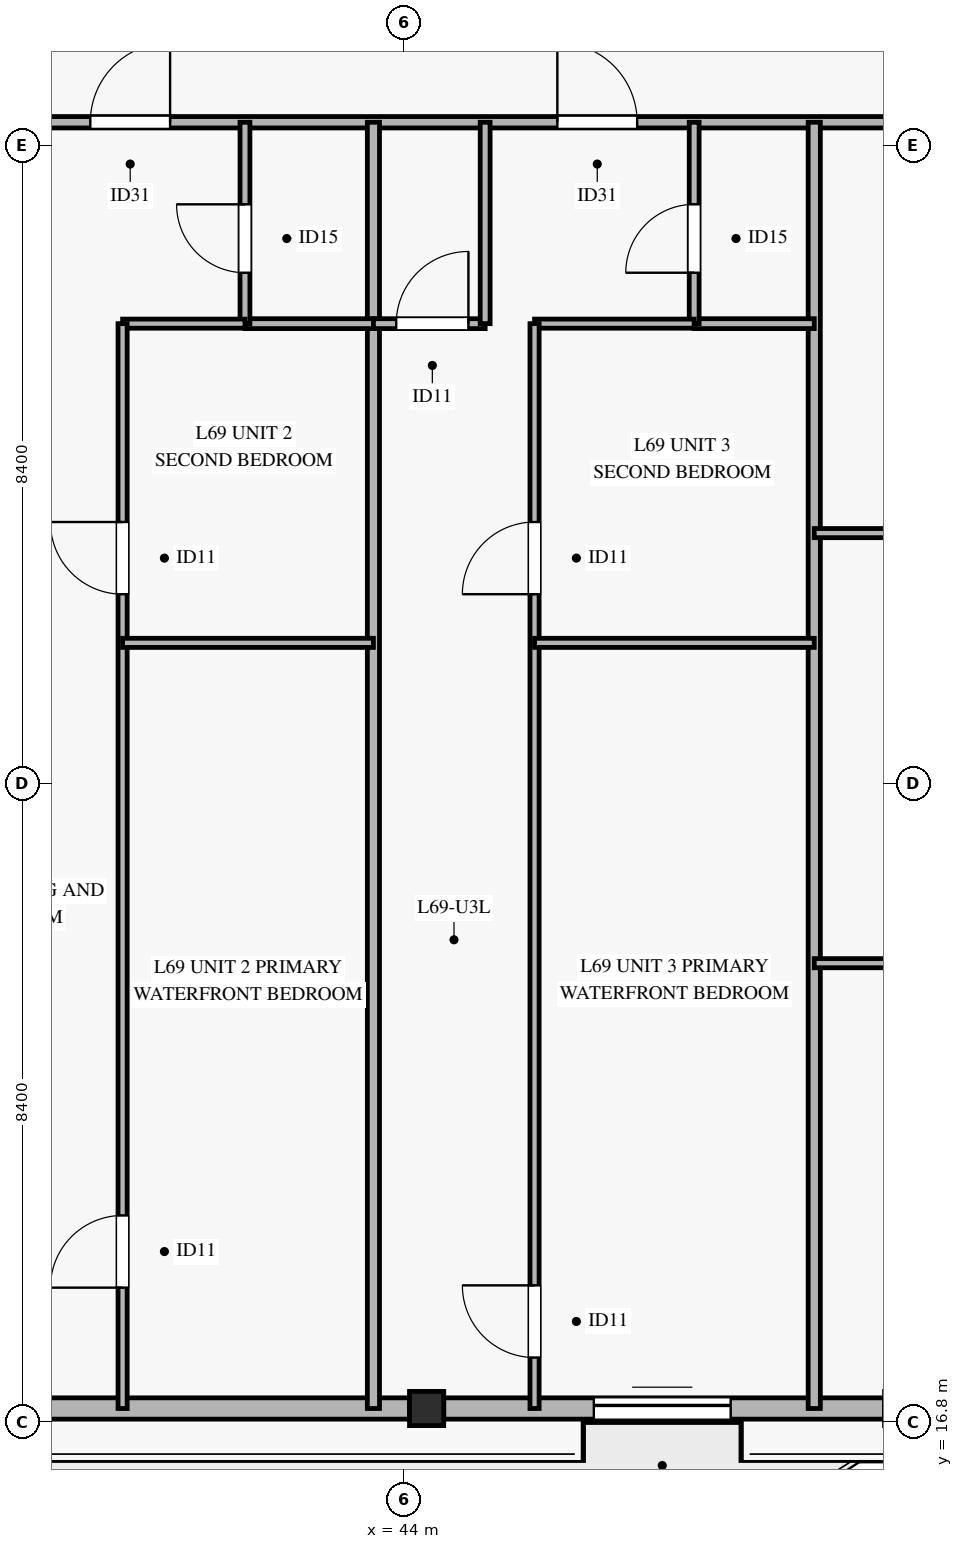
"""IFC4 building model, lengths in metres.
Left out: names, types, materials, properties, quantities, classifications, styles, units other than length and angle.
Written with IfcOpenShell. Run it as: python <this file> out.ifc"""

import sys

from ifc_helpers import new_model, si_unit, direction, frame, frame_2d, origin, origin_2d, place, context, subcontext, project, spatial, rectangle, hollow_rectangle, extrude, source, transform, mapped, element, fill, save


model = new_model("IFC4")
c1 = context("Model", 3, precision=1e-05, world=origin(), true_north=direction((0.0, 1.0)))
c2 = subcontext(c1, "Body", "Model", "MODEL_VIEW")
j1 = project(units=[si_unit("LENGTHUNIT", "METRE"), si_unit("PLANEANGLEUNIT", "RADIAN")], contexts=[c1])
p1 = place(None, origin())
s1 = spatial("IfcSite", under=j1, at=p1, CompositionType="ELEMENT")
p2 = place(p1, origin())
s2 = spatial("IfcBuilding", under=s1, at=p2, CompositionType="ELEMENT")
p3 = place(p2, frame((0.0, 0.0, 268.9)))
s3 = spatial("IfcBuildingStorey", under=s2, at=p3, CompositionType="ELEMENT", Elevation=268.9)
m1 = source(origin(), c2, "Body", "SweptSolid", [
    extrude(hollow_rectangle(XDim=0.45, YDim=0.45, WallThickness=0.022, at=origin_2d()), origin(), (0.0, 0.0, 1.0), 3.185),
])
p4 = place(p3, frame((44.3, 16.976, 0.0), z_axis=(0.0, 0.0, 1.0), x_axis=(1.0, 0.0, 0.0)))
e1 = element("IfcColumn", 1, at=p4, inside=s3, PredefinedType="COLUMN", context=c2, shape_type="MappedRepresentation", body=[
    mapped(m1, transform((0.0, 0.0, 0.0), x_axis=(1.0, 0.0, 0.0), y_axis=(0.0, 1.0, 0.0), z_axis=(0.0, 0.0, 1.0), scale=1.0)),
])
p5 = place(p3, frame((37.775, 16.976, 0.0), z_axis=(0.0, 0.0, 1.0), x_axis=(1.0, 0.0, 0.0)))
e2 = element("IfcWall", 2, at=p5, inside=s3, PredefinedType="SOLIDWALL", context=c2, shape_type="SweptSolid", body=[
    extrude(rectangle(XDim=6.3, YDim=0.28, at=frame_2d((3.15, 0.0))), origin(), (0.0, 0.0, 1.0), 2.815),
])
p6 = place(p3, frame((44.525, 16.976, 0.0), z_axis=(0.0, 0.0, 1.0), x_axis=(1.0, 0.0, 0.0)))
e3 = element("IfcWall", 3, at=p6, inside=s3, PredefinedType="SOLIDWALL", context=c2, shape_type="SweptSolid", body=[
    extrude(rectangle(XDim=5.8, YDim=0.28, at=frame_2d((2.9, 0.0))), origin(), (0.0, 0.0, 1.0), 2.815),
])
p7 = place(p6, frame((1.975, 0.0, 0.0)))
e4 = element("IfcOpeningElement", 4, at=p7, cuts=e3, PredefinedType="OPENING", context=c2, shape_type="SweptSolid", body=[
    extrude(rectangle(XDim=1.8, YDim=2.25, at=frame_2d((0.9, 1.125))), frame((0.0, 0.15, 0.0), z_axis=(0.0, -1.0, 0.0), x_axis=(1.0, 0.0, 0.0)), (0.0, 0.0, 1.0), 0.3),
])
p8 = place(p3, frame((9.194, 33.9, 0.0), z_axis=(0.0, 0.0, 1.0), x_axis=(1.0, 0.0, 0.0)))
e5 = element("IfcWall", 5, at=p8, inside=s3, PredefinedType="PARTITIONING", context=c2, shape_type="SweptSolid", body=[
    extrude(rectangle(XDim=52.013, YDim=0.15, at=frame_2d((26.006, 0.0))), origin(), (0.0, 0.0, 1.0), 2.47),
])
p9 = place(p8, frame((5.729, 0.0, 0.0)))
e6 = element("IfcOpeningElement", 6, at=p9, cuts=e5, PredefinedType="OPENING", context=c2, shape_type="SweptSolid", body=[
    extrude(rectangle(XDim=1.05, YDim=2.15, at=frame_2d((0.525, 1.075))), frame((0.0, 0.085, 0.0), z_axis=(0.0, -1.0, 0.0), x_axis=(1.0, 0.0, 0.0)), (0.0, 0.0, 1.0), 0.17),
])
p10 = place(p8, frame((17.231, 0.0, 0.0)))
e7 = element("IfcOpeningElement", 7, at=p10, cuts=e5, PredefinedType="OPENING", context=c2, shape_type="SweptSolid", body=[
    extrude(rectangle(XDim=1.05, YDim=2.15, at=frame_2d((0.525, 1.075))), frame((0.0, 0.085, 0.0), z_axis=(0.0, -1.0, 0.0), x_axis=(1.0, 0.0, 0.0)), (0.0, 0.0, 1.0), 0.17),
])
p11 = place(p8, frame((23.759, 0.0, 0.0)))
e8 = element("IfcOpeningElement", 8, at=p11, cuts=e5, PredefinedType="OPENING", context=c2, shape_type="SweptSolid", body=[
    extrude(rectangle(XDim=1.05, YDim=2.15, at=frame_2d((0.525, 1.075))), frame((0.0, 0.085, 0.0), z_axis=(0.0, -1.0, 0.0), x_axis=(1.0, 0.0, 0.0)), (0.0, 0.0, 1.0), 0.17),
])
p12 = place(p8, frame((30.681, 0.0, 0.0)))
e9 = element("IfcOpeningElement", 9, at=p12, cuts=e5, PredefinedType="OPENING", context=c2, shape_type="SweptSolid", body=[
    extrude(rectangle(XDim=1.05, YDim=2.15, at=frame_2d((0.525, 1.075))), frame((0.0, 0.085, 0.0), z_axis=(0.0, -1.0, 0.0), x_axis=(1.0, 0.0, 0.0)), (0.0, 0.0, 1.0), 0.17),
])
p13 = place(p8, frame((36.826, 0.0, 0.0)))
e10 = element("IfcOpeningElement", 10, at=p13, cuts=e5, PredefinedType="OPENING", context=c2, shape_type="SweptSolid", body=[
    extrude(rectangle(XDim=1.05, YDim=2.15, at=frame_2d((0.525, 1.075))), frame((0.0, 0.085, 0.0), z_axis=(0.0, -1.0, 0.0), x_axis=(1.0, 0.0, 0.0)), (0.0, 0.0, 1.0), 0.17),
])
p14 = place(p8, frame((44.786, 0.0, 0.0)))
e11 = element("IfcOpeningElement", 11, at=p14, cuts=e5, PredefinedType="OPENING", context=c2, shape_type="SweptSolid", body=[
    extrude(rectangle(XDim=1.05, YDim=2.15, at=frame_2d((0.525, 1.075))), frame((0.0, 0.085, 0.0), z_axis=(0.0, -1.0, 0.0), x_axis=(1.0, 0.0, 0.0)), (0.0, 0.0, 1.0), 0.17),
])
for number, where, z_axis, x_axis in (
    (12, (43.6, 16.976, 0.0), (0.0, 0.0, 1.0), (0.0, 1.0, 0.0)),
    (13, (49.4, 16.976, 0.0), (0.0, 0.0, 1.0), (0.0, 1.0, 0.0)),
):
    element("IfcWall", number, at=place(p3, frame(where, z_axis=z_axis, x_axis=x_axis)), inside=s3, PredefinedType="PARTITIONING", context=c2, shape_type="SweptSolid", body=[
        extrude(rectangle(XDim=16.924, YDim=0.16, at=frame_2d((8.462, 0.0))), origin(), (0.0, 0.0, 1.0), 2.77),
    ])
p15 = place(p3, frame((41.91, 31.25, 0.0), z_axis=(0.0, 0.0, 1.0), x_axis=(1.0, 0.0, 0.0)))
e14 = element("IfcWall", 14, at=p15, inside=s3, PredefinedType="PARTITIONING", context=c2, shape_type="SweptSolid", body=[
    extrude(rectangle(XDim=1.69, YDim=0.13, at=frame_2d((0.845, 0.0))), origin(), (0.0, 0.0, 1.0), 3.185),
])
p16 = place(p3, frame((41.91, 31.25, 0.0), z_axis=(0.0, 0.0, 1.0), x_axis=(0.0, 1.0, 0.0)))
e15 = element("IfcWall", 15, at=p16, inside=s3, PredefinedType="PARTITIONING", context=c2, shape_type="SweptSolid", body=[
    extrude(rectangle(XDim=2.65, YDim=0.13, at=frame_2d((1.325, 0.0))), origin(), (0.0, 0.0, 1.0), 2.77),
])
p17 = place(p16, frame((0.67, 0.0, 0.0)))
e16 = element("IfcOpeningElement", 16, at=p17, cuts=e15, PredefinedType="OPENING", context=c2, shape_type="SweptSolid", body=[
    extrude(rectangle(XDim=0.9, YDim=2.1, at=frame_2d((0.45, 1.05))), frame((0.0, 0.075, 0.0), z_axis=(0.0, -1.0, 0.0), x_axis=(1.0, 0.0, 0.0)), (0.0, 0.0, 1.0), 0.15),
])
p18 = place(p3, frame((40.3, 31.25, 0.0), z_axis=(0.0, 0.0, 1.0), x_axis=(1.0, 0.0, 0.0)))
e17 = element("IfcWall", 17, at=p18, inside=s3, PredefinedType="PARTITIONING", context=c2, shape_type="SweptSolid", body=[
    extrude(rectangle(XDim=1.61, YDim=0.12, at=frame_2d((0.805, 0.0))), origin(), (0.0, 0.0, 1.0), 3.185),
])
p19 = place(p3, frame((40.3, 16.976, 0.0), z_axis=(0.0, 0.0, 1.0), x_axis=(0.0, 1.0, 0.0)))
e18 = element("IfcWall", 18, at=p19, inside=s3, PredefinedType="PARTITIONING", context=c2, shape_type="SweptSolid", body=[
    extrude(rectangle(XDim=14.274, YDim=0.12, at=frame_2d((7.137, 0.0))), origin(), (0.0, 0.0, 1.0), 2.77),
])
p20 = place(p19, frame((1.59, 0.0, 0.0)))
e19 = element("IfcOpeningElement", 19, at=p20, cuts=e18, PredefinedType="OPENING", context=c2, shape_type="SweptSolid", body=[
    extrude(rectangle(XDim=0.95, YDim=2.1, at=frame_2d((0.475, 1.05))), frame((0.0, 0.07, 0.0), z_axis=(0.0, -1.0, 0.0), x_axis=(1.0, 0.0, 0.0)), (0.0, 0.0, 1.0), 0.14),
])
p21 = place(p19, frame((10.714, 0.0, 0.0)))
e20 = element("IfcOpeningElement", 20, at=p21, cuts=e18, PredefinedType="OPENING", context=c2, shape_type="SweptSolid", body=[
    extrude(rectangle(XDim=0.95, YDim=2.1, at=frame_2d((0.475, 1.05))), frame((0.0, 0.07, 0.0), z_axis=(0.0, -1.0, 0.0), x_axis=(1.0, 0.0, 0.0)), (0.0, 0.0, 1.0), 0.14),
])
p22 = place(p3, frame((40.3, 27.05, 0.0), z_axis=(0.0, 0.0, 1.0), x_axis=(1.0, 0.0, 0.0)))
e21 = element("IfcWall", 21, at=p22, inside=s3, PredefinedType="PARTITIONING", context=c2, shape_type="SweptSolid", body=[
    extrude(rectangle(XDim=3.3, YDim=0.12, at=frame_2d((1.65, 0.0))), origin(), (0.0, 0.0, 1.0), 2.77),
])
p23 = place(p3, frame((43.6, 31.25, 0.0), z_axis=(0.0, 0.0, 1.0), x_axis=(1.0, 0.0, 0.0)))
e22 = element("IfcWall", 22, at=p23, inside=s3, PredefinedType="PARTITIONING", context=c2, shape_type="SweptSolid", body=[
    extrude(rectangle(XDim=1.47, YDim=0.13, at=frame_2d((0.735, 0.0))), origin(), (0.0, 0.0, 1.0), 2.47),
])
p24 = place(p23, frame((0.3, 0.0, 0.0)))
e23 = element("IfcOpeningElement", 23, at=p24, cuts=e22, PredefinedType="OPENING", context=c2, shape_type="SweptSolid", body=[
    extrude(rectangle(XDim=0.95, YDim=2.1, at=frame_2d((0.475, 1.05))), frame((0.0, 0.075, 0.0), z_axis=(0.0, -1.0, 0.0), x_axis=(1.0, 0.0, 0.0)), (0.0, 0.0, 1.0), 0.15),
])
p25 = place(p3, frame((45.07, 31.25, 0.0), z_axis=(0.0, 0.0, 1.0), x_axis=(0.0, 1.0, 0.0)))
e24 = element("IfcWall", 24, at=p25, inside=s3, PredefinedType="PARTITIONING", context=c2, shape_type="SweptSolid", body=[
    extrude(rectangle(XDim=2.65, YDim=0.13, at=frame_2d((1.325, 0.0))), origin(), (0.0, 0.0, 1.0), 2.77),
])
p26 = place(p3, frame((47.82, 31.25, 0.0), z_axis=(0.0, 0.0, 1.0), x_axis=(1.0, 0.0, 0.0)))
e25 = element("IfcWall", 25, at=p26, inside=s3, PredefinedType="PARTITIONING", context=c2, shape_type="SweptSolid", body=[
    extrude(rectangle(XDim=1.58, YDim=0.13, at=frame_2d((0.79, 0.0))), origin(), (0.0, 0.0, 1.0), 3.185),
])
p27 = place(p3, frame((47.82, 31.25, 0.0), z_axis=(0.0, 0.0, 1.0), x_axis=(0.0, 1.0, 0.0)))
e26 = element("IfcWall", 26, at=p27, inside=s3, PredefinedType="PARTITIONING", context=c2, shape_type="SweptSolid", body=[
    extrude(rectangle(XDim=2.65, YDim=0.13, at=frame_2d((1.325, 0.0))), origin(), (0.0, 0.0, 1.0), 2.77),
])
p28 = place(p27, frame((0.67, 0.0, 0.0)))
e27 = element("IfcOpeningElement", 27, at=p28, cuts=e26, PredefinedType="OPENING", context=c2, shape_type="SweptSolid", body=[
    extrude(rectangle(XDim=0.9, YDim=2.1, at=frame_2d((0.45, 1.05))), frame((0.0, 0.075, 0.0), z_axis=(0.0, -1.0, 0.0), x_axis=(1.0, 0.0, 0.0)), (0.0, 0.0, 1.0), 0.15),
])
p29 = place(p3, frame((45.72, 31.25, 0.0), z_axis=(0.0, 0.0, 1.0), x_axis=(1.0, 0.0, 0.0)))
e28 = element("IfcWall", 28, at=p29, inside=s3, PredefinedType="PARTITIONING", context=c2, shape_type="SweptSolid", body=[
    extrude(rectangle(XDim=2.1, YDim=0.12, at=frame_2d((1.05, 0.0))), origin(), (0.0, 0.0, 1.0), 3.185),
])
p30 = place(p3, frame((45.72, 16.976, 0.0), z_axis=(0.0, 0.0, 1.0), x_axis=(0.0, 1.0, 0.0)))
e29 = element("IfcWall", 29, at=p30, inside=s3, PredefinedType="PARTITIONING", context=c2, shape_type="SweptSolid", body=[
    extrude(rectangle(XDim=14.274, YDim=0.12, at=frame_2d((7.137, 0.0))), origin(), (0.0, 0.0, 1.0), 2.77),
])
p31 = place(p30, frame((0.67, 0.0, 0.0)))
e30 = element("IfcOpeningElement", 30, at=p31, cuts=e29, PredefinedType="OPENING", context=c2, shape_type="SweptSolid", body=[
    extrude(rectangle(XDim=0.95, YDim=2.1, at=frame_2d((0.475, 1.05))), frame((0.0, 0.07, 0.0), z_axis=(0.0, -1.0, 0.0), x_axis=(1.0, 0.0, 0.0)), (0.0, 0.0, 1.0), 0.14),
])
p32 = place(p30, frame((10.714, 0.0, 0.0)))
e31 = element("IfcOpeningElement", 31, at=p32, cuts=e29, PredefinedType="OPENING", context=c2, shape_type="SweptSolid", body=[
    extrude(rectangle(XDim=0.95, YDim=2.1, at=frame_2d((0.475, 1.05))), frame((0.0, 0.07, 0.0), z_axis=(0.0, -1.0, 0.0), x_axis=(1.0, 0.0, 0.0)), (0.0, 0.0, 1.0), 0.14),
])
p33 = place(p3, frame((45.72, 27.05, 0.0), z_axis=(0.0, 0.0, 1.0), x_axis=(1.0, 0.0, 0.0)))
e32 = element("IfcWall", 32, at=p33, inside=s3, PredefinedType="PARTITIONING", context=c2, shape_type="SweptSolid", body=[
    extrude(rectangle(XDim=3.68, YDim=0.12, at=frame_2d((1.84, 0.0))), origin(), (0.0, 0.0, 1.0), 2.77),
])
p34 = place(p3, frame((49.4, 22.835, 0.0), z_axis=(0.0, 0.0, 1.0), x_axis=(1.0, 0.0, 0.0)))
e33 = element("IfcWall", 33, at=p34, inside=s3, PredefinedType="PARTITIONING", context=c2, shape_type="SweptSolid", body=[
    extrude(rectangle(XDim=11.807, YDim=0.12, at=frame_2d((5.904, 0.0))), origin(), (0.0, 0.0, 1.0), 2.47),
])
p35 = place(p34, frame((4.809, 0.0, 0.0)))
e34 = element("IfcOpeningElement", 34, at=p35, cuts=e33, PredefinedType="OPENING", context=c2, shape_type="SweptSolid", body=[
    extrude(rectangle(XDim=0.95, YDim=2.1, at=frame_2d((0.475, 1.05))), frame((0.0, 0.07, 0.0), z_axis=(0.0, -1.0, 0.0), x_axis=(1.0, 0.0, 0.0)), (0.0, 0.0, 1.0), 0.14),
])
p36 = place(p3, frame((49.4, 28.494, 0.0), z_axis=(0.0, 0.0, 1.0), x_axis=(1.0, 0.0, 0.0)))
e35 = element("IfcWall", 35, at=p36, inside=s3, PredefinedType="PARTITIONING", context=c2, shape_type="SweptSolid", body=[
    extrude(rectangle(XDim=11.807, YDim=0.12, at=frame_2d((5.904, 0.0))), origin(), (0.0, 0.0, 1.0), 2.47),
])
p37 = place(p36, frame((4.809, 0.0, 0.0)))
e36 = element("IfcOpeningElement", 36, at=p37, cuts=e35, PredefinedType="OPENING", context=c2, shape_type="SweptSolid", body=[
    extrude(rectangle(XDim=0.95, YDim=2.1, at=frame_2d((0.475, 1.05))), frame((0.0, 0.07, 0.0), z_axis=(0.0, -1.0, 0.0), x_axis=(1.0, 0.0, 0.0)), (0.0, 0.0, 1.0), 0.14),
])
m2 = source(origin(), c2, "Body", "SweptSolid", [
    extrude(rectangle(XDim=1.8, YDim=2.25, at=frame_2d((0.9, 1.125))), frame((0.0, 0.025, 0.0), z_axis=(0.0, -1.0, 0.0), x_axis=(1.0, 0.0, 0.0)), (0.0, 0.0, 1.0), 0.05),
])
p38 = place(p7, origin())
e37 = element("IfcDoor", 37, at=p38, inside=s3, OperationType="SLIDING_TO_LEFT", PredefinedType="DOOR", context=c2, shape_type="MappedRepresentation", body=[
    mapped(m2, transform((0.0, 0.0, 0.0), x_axis=(1.0, 0.0, 0.0), y_axis=(0.0, 1.0, 0.0), z_axis=(0.0, 0.0, 1.0), scale=1.0)),
])
fill(e4, e37)
m3 = source(origin(), c2, "Body", "SweptSolid", [
    extrude(rectangle(XDim=1.05, YDim=2.15, at=frame_2d((0.525, 1.075))), frame((0.0, 0.025, 0.0), z_axis=(0.0, -1.0, 0.0), x_axis=(1.0, 0.0, 0.0)), (0.0, 0.0, 1.0), 0.05),
])
p39 = place(p12, origin())
e38 = element("IfcDoor", 38, at=p39, inside=s3, OperationType="SINGLE_SWING_RIGHT", PredefinedType="DOOR", context=c2, shape_type="MappedRepresentation", body=[
    mapped(m3, transform((0.0, 0.0, 0.0), x_axis=(1.0, 0.0, 0.0), y_axis=(0.0, 1.0, 0.0), z_axis=(0.0, 0.0, 1.0), scale=1.0)),
])
fill(e9, e38)
m4 = source(origin(), c2, "Body", "SweptSolid", [
    extrude(rectangle(XDim=0.9, YDim=2.1, at=frame_2d((0.45, 1.05))), frame((0.0, 0.025, 0.0), z_axis=(0.0, -1.0, 0.0), x_axis=(1.0, 0.0, 0.0)), (0.0, 0.0, 1.0), 0.05),
])
p40 = place(p17, origin())
e39 = element("IfcDoor", 39, at=p40, inside=s3, OperationType="SINGLE_SWING_RIGHT", PredefinedType="DOOR", context=c2, shape_type="MappedRepresentation", body=[
    mapped(m4, transform((0.0, 0.0, 0.0), x_axis=(1.0, 0.0, 0.0), y_axis=(0.0, 1.0, 0.0), z_axis=(0.0, 0.0, 1.0), scale=1.0)),
])
fill(e16, e39)
m5 = source(origin(), c2, "Body", "SweptSolid", [
    extrude(rectangle(XDim=0.95, YDim=2.1, at=frame_2d((0.475, 1.05))), frame((0.0, 0.025, 0.0), z_axis=(0.0, -1.0, 0.0), x_axis=(1.0, 0.0, 0.0)), (0.0, 0.0, 1.0), 0.05),
])
p41 = place(p20, origin())
e40 = element("IfcDoor", 40, at=p41, inside=s3, OperationType="SINGLE_SWING_LEFT", PredefinedType="DOOR", context=c2, shape_type="MappedRepresentation", body=[
    mapped(m5, transform((0.0, 0.0, 0.0), x_axis=(1.0, 0.0, 0.0), y_axis=(0.0, 1.0, 0.0), z_axis=(0.0, 0.0, 1.0), scale=1.0)),
])
fill(e19, e40)
p42 = place(p21, origin())
e41 = element("IfcDoor", 41, at=p42, inside=s3, OperationType="SINGLE_SWING_RIGHT", PredefinedType="DOOR", context=c2, shape_type="MappedRepresentation", body=[
    mapped(m5, transform((0.0, 0.0, 0.0), x_axis=(1.0, 0.0, 0.0), y_axis=(0.0, 1.0, 0.0), z_axis=(0.0, 0.0, 1.0), scale=1.0)),
])
fill(e20, e41)
p43 = place(p13, origin())
e42 = element("IfcDoor", 42, at=p43, inside=s3, OperationType="SINGLE_SWING_LEFT", PredefinedType="DOOR", context=c2, shape_type="MappedRepresentation", body=[
    mapped(m3, transform((0.0, 0.0, 0.0), x_axis=(1.0, 0.0, 0.0), y_axis=(0.0, 1.0, 0.0), z_axis=(0.0, 0.0, 1.0), scale=1.0)),
])
fill(e10, e42)
p44 = place(p24, origin())
e43 = element("IfcDoor", 43, at=p44, inside=s3, OperationType="SINGLE_SWING_RIGHT", PredefinedType="DOOR", context=c2, shape_type="MappedRepresentation", body=[
    mapped(m5, transform((0.0, 0.0, 0.0), x_axis=(1.0, 0.0, 0.0), y_axis=(0.0, 1.0, 0.0), z_axis=(0.0, 0.0, 1.0), scale=1.0)),
])
fill(e23, e43)
p45 = place(p28, origin())
e44 = element("IfcDoor", 44, at=p45, inside=s3, OperationType="SINGLE_SWING_LEFT", PredefinedType="DOOR", context=c2, shape_type="MappedRepresentation", body=[
    mapped(m4, transform((0.0, 0.0, 0.0), x_axis=(1.0, 0.0, 0.0), y_axis=(0.0, 1.0, 0.0), z_axis=(0.0, 0.0, 1.0), scale=1.0)),
])
fill(e27, e44)
p46 = place(p31, origin())
e45 = element("IfcDoor", 45, at=p46, inside=s3, OperationType="SINGLE_SWING_RIGHT", PredefinedType="DOOR", context=c2, shape_type="MappedRepresentation", body=[
    mapped(m5, transform((0.0, 0.0, 0.0), x_axis=(1.0, 0.0, 0.0), y_axis=(0.0, 1.0, 0.0), z_axis=(0.0, 0.0, 1.0), scale=1.0)),
])
fill(e30, e45)
p47 = place(p32, origin())
e46 = element("IfcDoor", 46, at=p47, inside=s3, OperationType="SINGLE_SWING_LEFT", PredefinedType="DOOR", context=c2, shape_type="MappedRepresentation", body=[
    mapped(m5, transform((0.0, 0.0, 0.0), x_axis=(1.0, 0.0, 0.0), y_axis=(0.0, 1.0, 0.0), z_axis=(0.0, 0.0, 1.0), scale=1.0)),
])
fill(e31, e46)
save(model, sys.argv[1])
